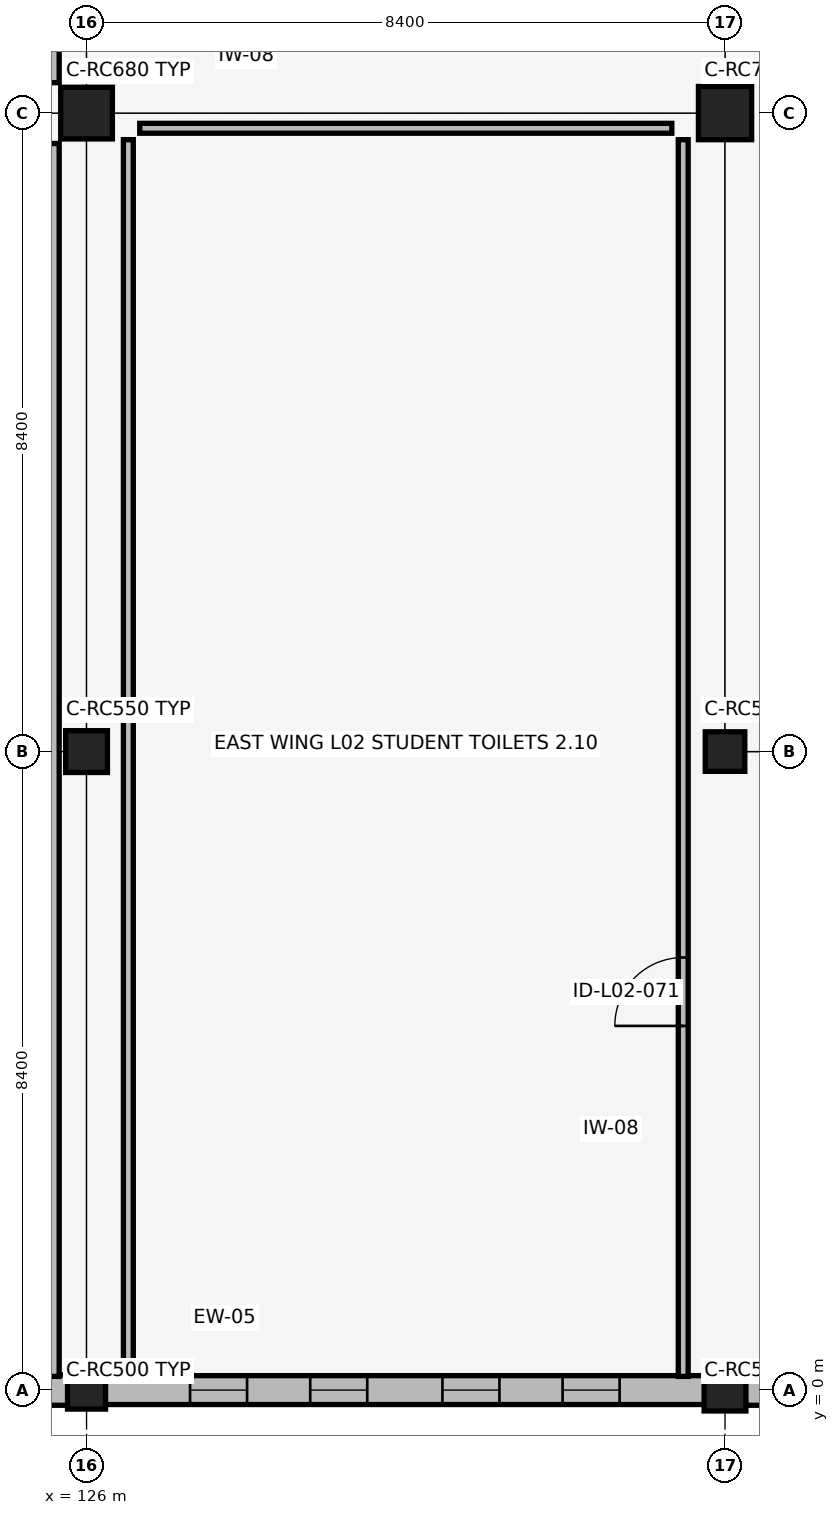
"""IFC4 building model, lengths in metres.
Left out: names, types, materials, properties, quantities, classifications, styles, units other than length and angle.
Written with IfcOpenShell. Run it as: python <this file> out.ifc"""

import sys

from ifc_helpers import new_model, si_unit, direction, frame, frame_2d, origin, origin_2d, place, context, subcontext, project, spatial, rectangle, extrude, element, fill, save


model = new_model("IFC4")
c1 = context("Model", 3, precision=1e-05, world=origin(), true_north=direction((0.0, 1.0)))
c2 = subcontext(c1, "Body", "Model", "MODEL_VIEW")
j1 = project(units=[si_unit("LENGTHUNIT", "METRE"), si_unit("PLANEANGLEUNIT", "RADIAN")], contexts=[c1])
p1 = place(None, origin())
s1 = spatial("IfcSite", under=j1, at=p1, CompositionType="ELEMENT")
p2 = place(p1, origin())
s2 = spatial("IfcBuilding", under=s1, at=p2, CompositionType="ELEMENT")
p3 = place(p2, frame((0.0, 0.0, 9.86)))
s3 = spatial("IfcBuildingStorey", under=s2, at=p3, CompositionType="ELEMENT", Elevation=9.86)
p4 = place(p3, frame((126.0, 0.0, 0.0), z_axis=(0.0, 0.0, 1.0), x_axis=(1.0, 0.0, 0.0)))
e1 = element("IfcColumn", 1, at=p4, inside=s3, PredefinedType="COLUMN", context=c2, shape_type="SweptSolid", body=[
    extrude(rectangle(XDim=0.5, YDim=0.5, at=origin_2d()), origin(), (0.0, 0.0, 1.0), 3.78),
])
p5 = place(p3, frame((126.0, 8.4, 0.0), z_axis=(0.0, 0.0, 1.0), x_axis=(1.0, 0.0, 0.0)))
e2 = element("IfcColumn", 2, at=p5, inside=s3, PredefinedType="COLUMN", context=c2, shape_type="SweptSolid", body=[
    extrude(rectangle(XDim=0.55, YDim=0.55, at=origin_2d()), origin(), (0.0, 0.0, 1.0), 3.78),
])
p6 = place(p3, frame((126.0, 16.8, 0.0), z_axis=(0.0, 0.0, 1.0), x_axis=(1.0, 0.0, 0.0)))
e3 = element("IfcColumn", 3, at=p6, inside=s3, PredefinedType="COLUMN", context=c2, shape_type="SweptSolid", body=[
    extrude(rectangle(XDim=0.68, YDim=0.68, at=origin_2d()), origin(), (0.0, 0.0, 1.0), 3.78),
])
p7 = place(p3, frame((134.4, 0.0, 0.0), z_axis=(0.0, 0.0, 1.0), x_axis=(1.0, 0.0, 0.0)))
e4 = element("IfcColumn", 4, at=p7, inside=s3, PredefinedType="COLUMN", context=c2, shape_type="SweptSolid", body=[
    extrude(rectangle(XDim=0.55, YDim=0.55, at=origin_2d()), origin(), (0.0, 0.0, 1.0), 3.78),
])
p8 = place(p3, frame((134.4, 8.4, 0.0), z_axis=(0.0, 0.0, 1.0), x_axis=(1.0, 0.0, 0.0)))
e5 = element("IfcColumn", 5, at=p8, inside=s3, PredefinedType="COLUMN", context=c2, shape_type="SweptSolid", body=[
    extrude(rectangle(XDim=0.52, YDim=0.52, at=origin_2d()), origin(), (0.0, 0.0, 1.0), 3.78),
])
p9 = place(p3, frame((134.4, 16.8, 0.0), z_axis=(0.0, 0.0, 1.0), x_axis=(1.0, 0.0, 0.0)))
e6 = element("IfcColumn", 6, at=p9, inside=s3, PredefinedType="COLUMN", context=c2, shape_type="SweptSolid", body=[
    extrude(rectangle(XDim=0.7, YDim=0.7, at=origin_2d()), origin(), (0.0, 0.0, 1.0), 3.78),
])
p10 = place(p3, frame((117.81, 0.0, 0.0), z_axis=(0.0, 0.0, 1.0), x_axis=(1.0, 0.0, 0.0)))
e7 = element("IfcWall", 7, at=p10, inside=s3, PredefinedType="SOLIDWALL", context=c2, shape_type="SweptSolid", body=[
    extrude(rectangle(XDim=7.955, YDim=0.4, at=frame_2d((3.978, 0.0))), origin(), (0.0, 0.0, 1.0), 3.02),
])
p11 = place(p10, frame((1.136, 0.0, 0.7)))
e8 = element("IfcOpeningElement", 8, at=p11, cuts=e7, PredefinedType="OPENING", context=c2, shape_type="SweptSolid", body=[
    extrude(rectangle(XDim=0.75, YDim=2.1, at=frame_2d((0.375, 1.05))), frame((0.0, 0.21, 0.0), z_axis=(0.0, -1.0, 0.0), x_axis=(1.0, 0.0, 0.0)), (0.0, 0.0, 1.0), 0.42),
])
p12 = place(p10, frame((2.728, 0.0, 0.7)))
e9 = element("IfcOpeningElement", 9, at=p12, cuts=e7, PredefinedType="OPENING", context=c2, shape_type="SweptSolid", body=[
    extrude(rectangle(XDim=0.75, YDim=2.1, at=frame_2d((0.375, 1.05))), frame((0.0, 0.21, 0.0), z_axis=(0.0, -1.0, 0.0), x_axis=(1.0, 0.0, 0.0)), (0.0, 0.0, 1.0), 0.42),
])
p13 = place(p10, frame((4.478, 0.0, 0.7)))
e10 = element("IfcOpeningElement", 10, at=p13, cuts=e7, PredefinedType="OPENING", context=c2, shape_type="SweptSolid", body=[
    extrude(rectangle(XDim=0.75, YDim=2.1, at=frame_2d((0.375, 1.05))), frame((0.0, 0.21, 0.0), z_axis=(0.0, -1.0, 0.0), x_axis=(1.0, 0.0, 0.0)), (0.0, 0.0, 1.0), 0.42),
])
p14 = place(p10, frame((6.069, 0.0, 0.7)))
e11 = element("IfcOpeningElement", 11, at=p14, cuts=e7, PredefinedType="OPENING", context=c2, shape_type="SweptSolid", body=[
    extrude(rectangle(XDim=0.75, YDim=2.1, at=frame_2d((0.375, 1.05))), frame((0.0, 0.21, 0.0), z_axis=(0.0, -1.0, 0.0), x_axis=(1.0, 0.0, 0.0)), (0.0, 0.0, 1.0), 0.42),
])
p15 = place(p3, frame((126.235, 0.0, 0.0), z_axis=(0.0, 0.0, 1.0), x_axis=(1.0, 0.0, 0.0)))
e12 = element("IfcWall", 12, at=p15, inside=s3, PredefinedType="SOLIDWALL", context=c2, shape_type="SweptSolid", body=[
    extrude(rectangle(XDim=7.905, YDim=0.38, at=frame_2d((3.952, 0.0))), origin(), (0.0, 0.0, 1.0), 3.01),
])
p16 = place(p15, frame((1.127, 0.0, 0.7)))
e13 = element("IfcOpeningElement", 13, at=p16, cuts=e12, PredefinedType="OPENING", context=c2, shape_type="SweptSolid", body=[
    extrude(rectangle(XDim=0.75, YDim=2.1, at=frame_2d((0.375, 1.05))), frame((0.0, 0.2, 0.0), z_axis=(0.0, -1.0, 0.0), x_axis=(1.0, 0.0, 0.0)), (0.0, 0.0, 1.0), 0.4),
])
p17 = place(p15, frame((2.708, 0.0, 0.7)))
e14 = element("IfcOpeningElement", 14, at=p17, cuts=e12, PredefinedType="OPENING", context=c2, shape_type="SweptSolid", body=[
    extrude(rectangle(XDim=0.75, YDim=2.1, at=frame_2d((0.375, 1.05))), frame((0.0, 0.2, 0.0), z_axis=(0.0, -1.0, 0.0), x_axis=(1.0, 0.0, 0.0)), (0.0, 0.0, 1.0), 0.4),
])
p18 = place(p15, frame((4.447, 0.0, 0.7)))
e15 = element("IfcOpeningElement", 15, at=p18, cuts=e12, PredefinedType="OPENING", context=c2, shape_type="SweptSolid", body=[
    extrude(rectangle(XDim=0.75, YDim=2.1, at=frame_2d((0.375, 1.05))), frame((0.0, 0.2, 0.0), z_axis=(0.0, -1.0, 0.0), x_axis=(1.0, 0.0, 0.0)), (0.0, 0.0, 1.0), 0.4),
])
p19 = place(p15, frame((6.028, 0.0, 0.7)))
e16 = element("IfcOpeningElement", 16, at=p19, cuts=e12, PredefinedType="OPENING", context=c2, shape_type="SweptSolid", body=[
    extrude(rectangle(XDim=0.75, YDim=2.1, at=frame_2d((0.375, 1.05))), frame((0.0, 0.2, 0.0), z_axis=(0.0, -1.0, 0.0), x_axis=(1.0, 0.0, 0.0)), (0.0, 0.0, 1.0), 0.4),
])
p20 = place(p3, frame((134.66, 0.0, 0.0), z_axis=(0.0, 0.0, 1.0), x_axis=(1.0, 0.0, 0.0)))
e17 = element("IfcWall", 17, at=p20, inside=s3, PredefinedType="SOLIDWALL", context=c2, shape_type="SweptSolid", body=[
    extrude(rectangle(XDim=7.905, YDim=0.4, at=frame_2d((3.953, 0.0))), origin(), (0.0, 0.0, 1.0), 3.01),
])
p21 = place(p20, frame((1.127, 0.0, 0.7)))
e18 = element("IfcOpeningElement", 18, at=p21, cuts=e17, PredefinedType="OPENING", context=c2, shape_type="SweptSolid", body=[
    extrude(rectangle(XDim=0.75, YDim=2.1, at=frame_2d((0.375, 1.05))), frame((0.0, 0.21, 0.0), z_axis=(0.0, -1.0, 0.0), x_axis=(1.0, 0.0, 0.0)), (0.0, 0.0, 1.0), 0.42),
])
p22 = place(p20, frame((4.447, 0.0, 0.7)))
e19 = element("IfcOpeningElement", 19, at=p22, cuts=e17, PredefinedType="OPENING", context=c2, shape_type="SweptSolid", body=[
    extrude(rectangle(XDim=0.75, YDim=2.1, at=frame_2d((0.375, 1.05))), frame((0.0, 0.21, 0.0), z_axis=(0.0, -1.0, 0.0), x_axis=(1.0, 0.0, 0.0)), (0.0, 0.0, 1.0), 0.42),
])
p23 = place(p20, frame((6.028, 0.0, 0.7)))
e20 = element("IfcOpeningElement", 20, at=p23, cuts=e17, PredefinedType="OPENING", context=c2, shape_type="SweptSolid", body=[
    extrude(rectangle(XDim=0.75, YDim=2.1, at=frame_2d((0.375, 1.05))), frame((0.0, 0.21, 0.0), z_axis=(0.0, -1.0, 0.0), x_axis=(1.0, 0.0, 0.0)), (0.0, 0.0, 1.0), 0.42),
])
p24 = place(p3, frame((125.55, 0.18, 0.0), z_axis=(0.0, 0.0, 1.0), x_axis=(0.0, 1.0, 0.0)))
e21 = element("IfcWall", 21, at=p24, inside=s3, PredefinedType="PARTITIONING", context=c2, shape_type="SweptSolid", body=[
    extrude(rectangle(XDim=16.22, YDim=0.18, at=frame_2d((8.11, 0.0))), origin(), (0.0, 0.0, 1.0), 2.96),
])
p25 = place(p3, frame((125.55, 17.2, 0.0), z_axis=(0.0, 0.0, 1.0), x_axis=(0.0, 1.0, 0.0)))
e22 = element("IfcWall", 22, at=p25, inside=s3, PredefinedType="PARTITIONING", context=c2, shape_type="SweptSolid", body=[
    extrude(rectangle(XDim=4.25, YDim=0.18, at=frame_2d((2.125, 0.0))), origin(), (0.0, 0.0, 1.0), 3.21),
])
p26 = place(p3, frame((133.85, 0.18, 0.0), z_axis=(0.0, 0.0, 1.0), x_axis=(0.0, 1.0, 0.0)))
e23 = element("IfcWall", 23, at=p26, inside=s3, PredefinedType="PARTITIONING", context=c2, shape_type="SweptSolid", body=[
    extrude(rectangle(XDim=16.27, YDim=0.13, at=frame_2d((8.135, 0.0))), origin(), (0.0, 0.0, 1.0), 2.91),
])
p27 = place(p26, frame((4.611, 0.0, 0.0)))
e24 = element("IfcOpeningElement", 24, at=p27, cuts=e23, PredefinedType="OPENING", context=c2, shape_type="SweptSolid", body=[
    extrude(rectangle(XDim=0.9, YDim=2.1, at=frame_2d((0.45, 1.05))), frame((0.0, 0.075, 0.0), z_axis=(0.0, -1.0, 0.0), x_axis=(1.0, 0.0, 0.0)), (0.0, 0.0, 1.0), 0.15),
])
p28 = place(p3, frame((126.7, 16.6, 0.0), z_axis=(0.0, 0.0, 1.0), x_axis=(1.0, 0.0, 0.0)))
e25 = element("IfcWall", 25, at=p28, inside=s3, PredefinedType="PARTITIONING", context=c2, shape_type="SweptSolid", body=[
    extrude(rectangle(XDim=7.0, YDim=0.13, at=frame_2d((3.5, 0.0))), origin(), (0.0, 0.0, 1.0), 2.91),
])
p29 = place(p3, frame((126.55, 0.18, 0.0), z_axis=(0.0, 0.0, 1.0), x_axis=(0.0, 1.0, 0.0)))
e26 = element("IfcWall", 26, at=p29, inside=s3, PredefinedType="PARTITIONING", context=c2, shape_type="SweptSolid", body=[
    extrude(rectangle(XDim=16.27, YDim=0.13, at=frame_2d((8.135, 0.0))), origin(), (0.0, 0.0, 1.0), 2.91),
])
p30 = place(p16, origin())
e27 = element("IfcWindow", 27, at=p30, inside=s3, PartitioningType="DOUBLE_PANEL_VERTICAL", PredefinedType="WINDOW", context=c2, shape_type="SweptSolid", body=[
    extrude(rectangle(XDim=0.75, YDim=2.1, at=frame_2d((0.375, 1.05))), frame((0.0, 0.03, 0.0), z_axis=(0.0, -1.0, 0.0), x_axis=(1.0, 0.0, 0.0)), (0.0, 0.0, 1.0), 0.06),
])
fill(e13, e27)
p31 = place(p17, origin())
e28 = element("IfcWindow", 28, at=p31, inside=s3, PartitioningType="DOUBLE_PANEL_VERTICAL", PredefinedType="WINDOW", context=c2, shape_type="SweptSolid", body=[
    extrude(rectangle(XDim=0.75, YDim=2.1, at=frame_2d((0.375, 1.05))), frame((0.0, 0.03, 0.0), z_axis=(0.0, -1.0, 0.0), x_axis=(1.0, 0.0, 0.0)), (0.0, 0.0, 1.0), 0.06),
])
fill(e14, e28)
p32 = place(p18, origin())
e29 = element("IfcWindow", 29, at=p32, inside=s3, PartitioningType="DOUBLE_PANEL_VERTICAL", PredefinedType="WINDOW", context=c2, shape_type="SweptSolid", body=[
    extrude(rectangle(XDim=0.75, YDim=2.1, at=frame_2d((0.375, 1.05))), frame((0.0, 0.03, 0.0), z_axis=(0.0, -1.0, 0.0), x_axis=(1.0, 0.0, 0.0)), (0.0, 0.0, 1.0), 0.06),
])
fill(e15, e29)
p33 = place(p19, origin())
e30 = element("IfcWindow", 30, at=p33, inside=s3, PartitioningType="DOUBLE_PANEL_VERTICAL", PredefinedType="WINDOW", context=c2, shape_type="SweptSolid", body=[
    extrude(rectangle(XDim=0.75, YDim=2.1, at=frame_2d((0.375, 1.05))), frame((0.0, 0.03, 0.0), z_axis=(0.0, -1.0, 0.0), x_axis=(1.0, 0.0, 0.0)), (0.0, 0.0, 1.0), 0.06),
])
fill(e16, e30)
p34 = place(p27, origin())
e31 = element("IfcDoor", 31, at=p34, inside=s3, OperationType="SINGLE_SWING_LEFT", PredefinedType="DOOR", context=c2, shape_type="SweptSolid", body=[
    extrude(rectangle(XDim=0.9, YDim=2.1, at=frame_2d((0.45, 1.05))), frame((0.0, 0.025, 0.0), z_axis=(0.0, -1.0, 0.0), x_axis=(1.0, 0.0, 0.0)), (0.0, 0.0, 1.0), 0.05),
])
fill(e24, e31)
save(model, sys.argv[1])
